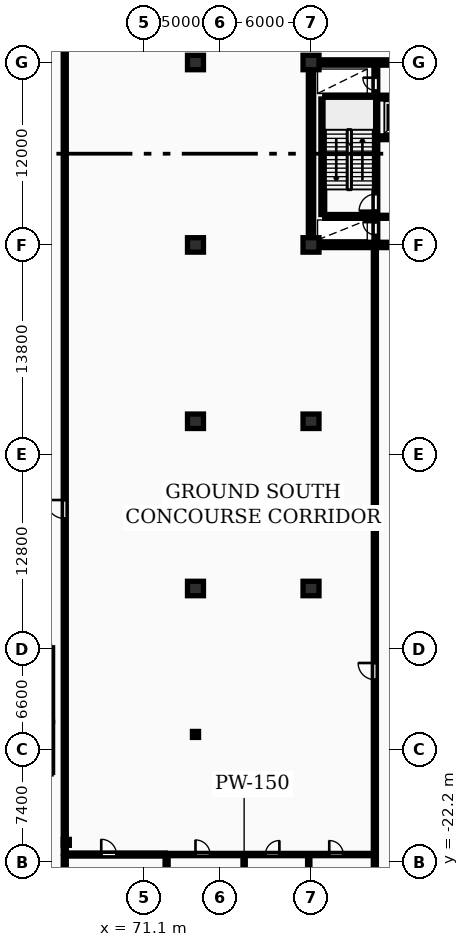
"""IFC4 building model, lengths in metres.
Left out: names, types, materials, properties, quantities, classifications, styles, units other than length and angle.
Written with IfcOpenShell. Run it as: python <this file> out.ifc"""

import sys

from ifc_helpers import new_model, si_unit, direction, frame, frame_2d, origin, origin_2d, place, context, subcontext, project, spatial, rectangle, i_section, extrude, element, fill, save


model = new_model("IFC4")
c1 = context("Model", 3, precision=1e-05, world=origin(), true_north=direction((0.0, 1.0)))
c2 = subcontext(c1, "Body", "Model", "MODEL_VIEW")
j1 = project(units=[si_unit("LENGTHUNIT", "METRE"), si_unit("PLANEANGLEUNIT", "RADIAN")], contexts=[c1])
p1 = place(None, origin())
s1 = spatial("IfcSite", under=j1, at=p1, CompositionType="ELEMENT")
p2 = place(p1, origin())
s2 = spatial("IfcBuilding", under=s1, at=p2, CompositionType="ELEMENT")
p3 = place(p2, origin())
s3 = spatial("IfcBuildingStorey", under=s2, at=p3, CompositionType="ELEMENT", Elevation=0.0)
for number, where, z_axis, x_axis in (
    (1, (74.5, -4.2, 0.0), (0.0, 0.0, 1.0), (1.0, 0.0, 0.0)),
    (2, (74.5, 6.8, 0.0), (0.0, 0.0, 1.0), (1.0, 0.0, 0.0)),
    (3, (74.5, 18.4, 0.0), (0.0, 0.0, 1.0), (1.0, 0.0, 0.0)),
    (4, (74.5, 30.4, 0.0), (0.0, 0.0, 1.0), (1.0, 0.0, 0.0)),
    (5, (82.1, -4.2, 0.0), (0.0, 0.0, 1.0), (1.0, 0.0, 0.0)),
    (6, (82.1, 6.8, 0.0), (0.0, 0.0, 1.0), (1.0, 0.0, 0.0)),
    (7, (82.1, 18.4, 0.0), (0.0, 0.0, 1.0), (1.0, 0.0, 0.0)),
    (8, (82.1, 30.4, 0.0), (0.0, 0.0, 1.0), (1.0, 0.0, 0.0)),
):
    element("IfcColumn", number, at=place(p3, frame(where, z_axis=z_axis, x_axis=x_axis)), inside=s3, PredefinedType="COLUMN", context=c2, shape_type="SweptSolid", body=[
        extrude(rectangle(XDim=1.05, YDim=0.95, at=origin_2d()), origin(), (0.0, 0.0, 1.0), 5.4),
    ])
for number, where, z_axis, x_axis in (
    (9, (74.5, -13.8, 0.0), (0.0, 0.0, 1.0), (1.0, 0.0, 0.0)),
    (10, (66.0, -20.9, 0.0), (0.0, 0.0, 1.0), (1.0, 0.0, 0.0)),
):
    element("IfcColumn", number, at=place(p3, frame(where, z_axis=z_axis, x_axis=x_axis)), inside=s3, PredefinedType="COLUMN", context=c2, shape_type="SweptSolid", body=[
        extrude(i_section(OverallWidth=0.399, OverallDepth=0.394, WebThickness=0.023, FlangeThickness=0.037, FilletRadius=0.015, at=origin_2d()), origin(), (0.0, 0.0, 1.0), 5.4),
    ])
p4 = place(p3, frame((81.925, 30.4, 0.0), z_axis=(0.0, 0.0, 1.0), x_axis=(1.0, 0.0, 0.0)))
e11 = element("IfcWall", 11, at=p4, inside=s3, PredefinedType="SHEAR", context=c2, shape_type="SweptSolid", body=[
    extrude(rectangle(XDim=36.265, YDim=0.35, at=frame_2d((18.132, 0.0))), origin(), (0.0, 0.0, 1.0), 5.4),
])
p5 = place(p3, frame((82.1, 18.575, 0.0), z_axis=(0.0, 0.0, 1.0), x_axis=(0.0, 1.0, 0.0)))
e12 = element("IfcWall", 12, at=p5, inside=s3, PredefinedType="SHEAR", context=c2, shape_type="SweptSolid", body=[
    extrude(rectangle(XDim=11.65, YDim=0.35, at=frame_2d((5.825, 0.0))), origin(), (0.0, 0.0, 1.0), 5.4),
])
p6 = place(p3, frame((81.925, 18.4, 0.0), z_axis=(0.0, 0.0, 1.0), x_axis=(1.0, 0.0, 0.0)))
e13 = element("IfcWall", 13, at=p6, inside=s3, PredefinedType="SHEAR", context=c2, shape_type="SweptSolid", body=[
    extrude(rectangle(XDim=36.265, YDim=0.35, at=frame_2d((18.132, 0.0))), origin(), (0.0, 0.0, 1.0), 5.4),
])
p7 = place(p6, frame((5.675, 0.0, 0.0)))
e14 = element("IfcOpeningElement", 14, at=p7, cuts=e13, PredefinedType="OPENING", context=c2, shape_type="SweptSolid", body=[
    extrude(rectangle(XDim=1.0, YDim=2.15, at=frame_2d((0.5, 1.075))), frame((0.0, 0.185, 0.0), z_axis=(0.0, -1.0, 0.0), x_axis=(1.0, 0.0, 0.0)), (0.0, 0.0, 1.0), 0.37),
])
p8 = place(p6, frame((21.925, 0.0, 0.0)))
e15 = element("IfcOpeningElement", 15, at=p8, cuts=e13, PredefinedType="OPENING", context=c2, shape_type="SweptSolid", body=[
    extrude(rectangle(XDim=1.5, YDim=2.2, at=frame_2d((0.75, 1.1))), frame((0.0, 0.185, 0.0), z_axis=(0.0, -1.0, 0.0), x_axis=(1.0, 0.0, 0.0)), (0.0, 0.0, 1.0), 0.37),
])
p9 = place(p6, frame((29.875, 0.0, 0.0)))
e16 = element("IfcOpeningElement", 16, at=p9, cuts=e13, PredefinedType="OPENING", context=c2, shape_type="SweptSolid", body=[
    extrude(rectangle(XDim=1.0, YDim=2.15, at=frame_2d((0.5, 1.075))), frame((0.0, 0.185, 0.0), z_axis=(0.0, -1.0, 0.0), x_axis=(1.0, 0.0, 0.0)), (0.0, 0.0, 1.0), 0.37),
])
p10 = place(p3, frame((82.875, 20.4, 0.0), z_axis=(0.0, 0.0, 1.0), x_axis=(0.0, 1.0, 0.0)))
e17 = element("IfcWall", 17, at=p10, inside=s3, PredefinedType="SHEAR", context=c2, shape_type="SweptSolid", body=[
    extrude(rectangle(XDim=7.6, YDim=0.25, at=frame_2d((3.8, 0.0))), origin(), (0.0, 0.0, 1.0), 5.4),
])
p11 = place(p3, frame((86.365, 18.6, 0.0), z_axis=(0.0, 0.0, 1.0), x_axis=(0.0, 1.0, 0.0)))
e18 = element("IfcWall", 18, at=p11, inside=s3, PredefinedType="SHEAR", context=c2, shape_type="SweptSolid", body=[
    extrude(rectangle(XDim=11.6, YDim=0.25, at=frame_2d((5.8, 0.0))), origin(), (0.0, 0.0, 1.0), 5.4),
])
p12 = place(p11, frame((0.45, 0.0, 0.0)))
e19 = element("IfcOpeningElement", 19, at=p12, cuts=e18, PredefinedType="OPENING", context=c2, shape_type="SweptSolid", body=[
    extrude(rectangle(XDim=0.85, YDim=2.05, at=frame_2d((0.425, 1.025))), frame((0.0, 0.135, 0.0), z_axis=(0.0, -1.0, 0.0), x_axis=(1.0, 0.0, 0.0)), (0.0, 0.0, 1.0), 0.27),
])
p13 = place(p11, frame((2.05, 0.0, 0.0)))
e20 = element("IfcOpeningElement", 20, at=p13, cuts=e18, PredefinedType="OPENING", context=c2, shape_type="SweptSolid", body=[
    extrude(rectangle(XDim=1.1, YDim=2.1, at=frame_2d((0.55, 1.05))), frame((0.0, 0.135, 0.0), z_axis=(0.0, -1.0, 0.0), x_axis=(1.0, 0.0, 0.0)), (0.0, 0.0, 1.0), 0.27),
])
p14 = place(p11, frame((9.95, 0.0, 0.0)))
e21 = element("IfcOpeningElement", 21, at=p14, cuts=e18, PredefinedType="OPENING", context=c2, shape_type="SweptSolid", body=[
    extrude(rectangle(XDim=0.85, YDim=2.05, at=frame_2d((0.425, 1.025))), frame((0.0, 0.135, 0.0), z_axis=(0.0, -1.0, 0.0), x_axis=(1.0, 0.0, 0.0)), (0.0, 0.0, 1.0), 0.27),
])
p15 = place(p3, frame((83.0, 20.275, 0.0), z_axis=(0.0, 0.0, 1.0), x_axis=(1.0, 0.0, 0.0)))
e22 = element("IfcWall", 22, at=p15, inside=s3, PredefinedType="SHEAR", context=c2, shape_type="SweptSolid", body=[
    extrude(rectangle(XDim=3.24, YDim=0.25, at=frame_2d((1.62, 0.0))), origin(), (0.0, 0.0, 1.0), 5.4),
])
p16 = place(p3, frame((83.0, 28.125, 0.0), z_axis=(0.0, 0.0, 1.0), x_axis=(1.0, 0.0, 0.0)))
e23 = element("IfcWall", 23, at=p16, inside=s3, PredefinedType="SHEAR", context=c2, shape_type="SweptSolid", body=[
    extrude(rectangle(XDim=7.82, YDim=0.25, at=frame_2d((3.91, 0.0))), origin(), (0.0, 0.0, 1.0), 5.4),
])
p17 = place(p3, frame((86.5, 25.45, 0.0), z_axis=(0.0, 0.0, 1.0), x_axis=(1.0, 0.0, 0.0)))
e24 = element("IfcWall", 24, at=p17, inside=s3, PredefinedType="SHEAR", context=c2, shape_type="SweptSolid", body=[
    extrude(rectangle(XDim=4.32, YDim=0.25, at=frame_2d((2.16, 0.0))), origin(), (0.0, 0.0, 1.0), 5.4),
])
p18 = place(p17, frame((1.14, 0.0, 0.0)))
e25 = element("IfcOpeningElement", 25, at=p18, cuts=e24, PredefinedType="OPENING", context=c2, shape_type="SweptSolid", body=[
    extrude(rectangle(XDim=1.12, YDim=2.12, at=frame_2d((0.56, 1.06))), frame((0.0, 0.135, 0.0), z_axis=(0.0, -1.0, 0.0), x_axis=(1.0, 0.0, 0.0)), (0.0, 0.0, 1.0), 0.27),
])
p19 = place(p17, frame((3.25, 0.0, 0.0)))
e26 = element("IfcOpeningElement", 26, at=p19, cuts=e24, PredefinedType="OPENING", context=c2, shape_type="SweptSolid", body=[
    extrude(rectangle(XDim=0.85, YDim=2.05, at=frame_2d((0.425, 1.025))), frame((0.0, 0.135, 0.0), z_axis=(0.0, -1.0, 0.0), x_axis=(1.0, 0.0, 0.0)), (0.0, 0.0, 1.0), 0.27),
])
p20 = place(p3, frame((86.5, 20.25, 0.0), z_axis=(0.0, 0.0, 1.0), x_axis=(1.0, 0.0, 0.0)))
e27 = element("IfcWall", 27, at=p20, inside=s3, PredefinedType="PARTITIONING", context=c2, shape_type="SweptSolid", body=[
    extrude(rectangle(XDim=4.32, YDim=0.2, at=frame_2d((2.16, 0.0))), origin(), (0.0, 0.0, 1.0), 5.1),
])
p21 = place(p20, frame((1.4, 0.0, 0.0)))
e28 = element("IfcOpeningElement", 28, at=p21, cuts=e27, PredefinedType="OPENING", context=c2, shape_type="SweptSolid", body=[
    extrude(rectangle(XDim=1.1, YDim=2.1, at=frame_2d((0.55, 1.05))), frame((0.0, 0.11, 0.0), z_axis=(0.0, -1.0, 0.0), x_axis=(1.0, 0.0, 0.0)), (0.0, 0.0, 1.0), 0.22),
])
p22 = place(p3, frame((65.0, -12.925, 0.0), z_axis=(0.0, 0.0, 1.0), x_axis=(0.0, 1.0, 0.0)))
e29 = element("IfcWall", 29, at=p22, inside=s3, PredefinedType="PARTITIONING", context=c2, shape_type="SweptSolid", body=[
    extrude(rectangle(XDim=4.825, YDim=0.2, at=frame_2d((2.413, 0.0))), origin(), (0.0, 0.0, 1.0), 5.1),
])
p23 = place(p22, frame((1.6, 0.0, 0.0)))
e30 = element("IfcOpeningElement", 30, at=p23, cuts=e29, PredefinedType="OPENING", context=c2, shape_type="SweptSolid", body=[
    extrude(rectangle(XDim=1.1, YDim=2.15, at=frame_2d((0.55, 1.075))), frame((0.0, 0.11, 0.0), z_axis=(0.0, -1.0, 0.0), x_axis=(1.0, 0.0, 0.0)), (0.0, 0.0, 1.0), 0.22),
])
p24 = place(p3, frame((65.9, -21.7, 0.0), z_axis=(0.0, 0.0, 1.0), x_axis=(1.0, 0.0, 0.0)))
e31 = element("IfcWall", 31, at=p24, inside=s3, PredefinedType="PARTITIONING", context=c2, shape_type="SweptSolid", body=[
    extrude(rectangle(XDim=6.6, YDim=0.2, at=frame_2d((3.3, 0.0))), origin(), (0.0, 0.0, 1.0), 5.1),
])
p25 = place(p24, frame((2.4, 0.0, 0.0)))
e32 = element("IfcOpeningElement", 32, at=p25, cuts=e31, PredefinedType="OPENING", context=c2, shape_type="SweptSolid", body=[
    extrude(rectangle(XDim=1.0, YDim=2.1, at=frame_2d((0.5, 1.05))), frame((0.0, 0.11, 0.0), z_axis=(0.0, -1.0, 0.0), x_axis=(1.0, 0.0, 0.0)), (0.0, 0.0, 1.0), 0.22),
])
for number, where, z_axis, x_axis in (
    (33, (65.9, -26.2, 0.0), (0.0, 0.0, 1.0), (0.0, 1.0, 0.0)),
    (34, (72.6, -26.2, 0.0), (0.0, 0.0, 1.0), (0.0, 1.0, 0.0)),
):
    element("IfcWall", number, at=place(p3, frame(where, z_axis=z_axis, x_axis=x_axis)), inside=s3, PredefinedType="PARTITIONING", context=c2, shape_type="SweptSolid", body=[
        extrude(rectangle(XDim=4.35, YDim=0.2, at=frame_2d((2.175, 0.0))), origin(), (0.0, 0.0, 1.0), 5.1),
    ])
p26 = place(p3, frame((86.3, -26.2, 0.0), z_axis=(0.0, 0.0, 1.0), x_axis=(0.0, 1.0, 0.0)))
e35 = element("IfcWall", 35, at=p26, inside=s3, PredefinedType="PARTITIONING", context=c2, shape_type="SweptSolid", body=[
    extrude(rectangle(XDim=44.35, YDim=0.2, at=frame_2d((22.175, 0.0))), origin(), (0.0, 0.0, 1.0), 5.1),
])
p27 = place(p26, frame((16.0, 0.0, 0.0)))
e36 = element("IfcOpeningElement", 36, at=p27, cuts=e35, PredefinedType="OPENING", context=c2, shape_type="SweptSolid", body=[
    extrude(rectangle(XDim=1.1, YDim=2.1, at=frame_2d((0.55, 1.05))), frame((0.0, 0.11, 0.0), z_axis=(0.0, -1.0, 0.0), x_axis=(1.0, 0.0, 0.0)), (0.0, 0.0, 1.0), 0.22),
])
p28 = place(p3, frame((65.0, -16.3, 0.0), z_axis=(0.0, 0.0, 1.0), x_axis=(0.0, 1.0, 0.0)))
e37 = element("IfcWall", 37, at=p28, inside=s3, PredefinedType="PARTITIONING", context=c2, shape_type="SweptSolid", body=[
    extrude(rectangle(XDim=3.3, YDim=0.2, at=frame_2d((1.65, 0.0))), origin(), (0.0, 0.0, 1.0), 5.1),
])
p29 = place(p3, frame((72.7, -21.7, 0.0), z_axis=(0.0, 0.0, 1.0), x_axis=(1.0, 0.0, 0.0)))
e38 = element("IfcWall", 38, at=p29, inside=s3, PredefinedType="PARTITIONING", context=c2, shape_type="SweptSolid", body=[
    extrude(rectangle(XDim=13.5, YDim=0.15, at=frame_2d((6.75, 0.0))), origin(), (0.0, 0.0, 1.0), 5.1),
])
p30 = place(p29, frame((1.8, 0.0, 0.0)))
e39 = element("IfcOpeningElement", 39, at=p30, cuts=e38, PredefinedType="OPENING", context=c2, shape_type="SweptSolid", body=[
    extrude(rectangle(XDim=0.96, YDim=2.1, at=frame_2d((0.48, 1.05))), frame((0.0, 0.085, 0.0), z_axis=(0.0, -1.0, 0.0), x_axis=(1.0, 0.0, 0.0)), (0.0, 0.0, 1.0), 0.17),
])
p31 = place(p29, frame((6.4, 0.0, 0.0)))
e40 = element("IfcOpeningElement", 40, at=p31, cuts=e38, PredefinedType="OPENING", context=c2, shape_type="SweptSolid", body=[
    extrude(rectangle(XDim=0.92, YDim=2.08, at=frame_2d((0.46, 1.04))), frame((0.0, 0.085, 0.0), z_axis=(0.0, -1.0, 0.0), x_axis=(1.0, 0.0, 0.0)), (0.0, 0.0, 1.0), 0.17),
])
p32 = place(p29, frame((10.6, 0.0, 0.0)))
e41 = element("IfcOpeningElement", 41, at=p32, cuts=e38, PredefinedType="OPENING", context=c2, shape_type="SweptSolid", body=[
    extrude(rectangle(XDim=0.92, YDim=2.08, at=frame_2d((0.46, 1.04))), frame((0.0, 0.085, 0.0), z_axis=(0.0, -1.0, 0.0), x_axis=(1.0, 0.0, 0.0)), (0.0, 0.0, 1.0), 0.17),
])
for number, where, z_axis, x_axis in (
    (42, (77.7, -26.2, 0.0), (0.0, 0.0, 1.0), (0.0, 1.0, 0.0)),
    (43, (81.95, -26.2, 0.0), (0.0, 0.0, 1.0), (0.0, 1.0, 0.0)),
):
    element("IfcWall", number, at=place(p3, frame(where, z_axis=z_axis, x_axis=x_axis)), inside=s3, PredefinedType="PARTITIONING", context=c2, shape_type="SweptSolid", body=[
        extrude(rectangle(XDim=4.4, YDim=0.15, at=frame_2d((2.2, 0.0))), origin(), (0.0, 0.0, 1.0), 5.1),
    ])
p33 = place(p3, frame((65.9, -21.6, 0.0), z_axis=(0.0, 0.0, 1.0), x_axis=(0.0, 1.0, 0.0)))
e44 = element("IfcWall", 44, at=p33, inside=s3, PredefinedType="PARTITIONING", context=c2, shape_type="SweptSolid", body=[
    extrude(rectangle(XDim=53.15, YDim=0.2, at=frame_2d((26.575, 0.0))), origin(), (0.0, 0.0, 1.0), 5.1),
])
p34 = place(p33, frame((22.0, 0.0, 0.0)))
e45 = element("IfcOpeningElement", 45, at=p34, cuts=e44, PredefinedType="OPENING", context=c2, shape_type="SweptSolid", body=[
    extrude(rectangle(XDim=1.22, YDim=2.18, at=frame_2d((0.61, 1.09))), frame((0.0, 0.11, 0.0), z_axis=(0.0, -1.0, 0.0), x_axis=(1.0, 0.0, 0.0)), (0.0, 0.0, 1.0), 0.22),
])
p35 = place(p12, origin())
e46 = element("IfcDoor", 46, at=p35, inside=s3, OperationType="SINGLE_SWING_RIGHT", PredefinedType="DOOR", context=c2, shape_type="SweptSolid", body=[
    extrude(rectangle(XDim=0.85, YDim=2.05, at=frame_2d((0.425, 1.025))), frame((0.0, 0.025, 0.0), z_axis=(0.0, -1.0, 0.0), x_axis=(1.0, 0.0, 0.0)), (0.0, 0.0, 1.0), 0.05),
])
fill(e19, e46)
p36 = place(p13, origin())
e47 = element("IfcDoor", 47, at=p36, inside=s3, OperationType="SINGLE_SWING_LEFT", PredefinedType="DOOR", context=c2, shape_type="SweptSolid", body=[
    extrude(rectangle(XDim=1.1, YDim=2.1, at=frame_2d((0.55, 1.05))), frame((0.0, 0.025, 0.0), z_axis=(0.0, -1.0, 0.0), x_axis=(1.0, 0.0, 0.0)), (0.0, 0.0, 1.0), 0.05),
])
fill(e20, e47)
p37 = place(p14, origin())
e48 = element("IfcDoor", 48, at=p37, inside=s3, OperationType="SINGLE_SWING_RIGHT", PredefinedType="DOOR", context=c2, shape_type="SweptSolid", body=[
    extrude(rectangle(XDim=0.85, YDim=2.05, at=frame_2d((0.425, 1.025))), frame((0.0, 0.025, 0.0), z_axis=(0.0, -1.0, 0.0), x_axis=(1.0, 0.0, 0.0)), (0.0, 0.0, 1.0), 0.05),
])
fill(e21, e48)
p38 = place(p25, origin())
e49 = element("IfcDoor", 49, at=p38, inside=s3, OperationType="SINGLE_SWING_LEFT", PredefinedType="DOOR", context=c2, shape_type="SweptSolid", body=[
    extrude(rectangle(XDim=1.0, YDim=2.1, at=frame_2d((0.5, 1.05))), frame((0.0, 0.025, 0.0), z_axis=(0.0, -1.0, 0.0), x_axis=(1.0, 0.0, 0.0)), (0.0, 0.0, 1.0), 0.05),
])
fill(e32, e49)
p39 = place(p27, origin())
e50 = element("IfcDoor", 50, at=p39, inside=s3, OperationType="SINGLE_SWING_RIGHT", PredefinedType="DOOR", context=c2, shape_type="SweptSolid", body=[
    extrude(rectangle(XDim=1.1, YDim=2.1, at=frame_2d((0.55, 1.05))), frame((0.0, 0.025, 0.0), z_axis=(0.0, -1.0, 0.0), x_axis=(1.0, 0.0, 0.0)), (0.0, 0.0, 1.0), 0.05),
])
fill(e36, e50)
p40 = place(p30, origin())
e51 = element("IfcDoor", 51, at=p40, inside=s3, OperationType="SINGLE_SWING_LEFT", PredefinedType="DOOR", context=c2, shape_type="SweptSolid", body=[
    extrude(rectangle(XDim=0.96, YDim=2.1, at=frame_2d((0.48, 1.05))), frame((0.0, 0.025, 0.0), z_axis=(0.0, -1.0, 0.0), x_axis=(1.0, 0.0, 0.0)), (0.0, 0.0, 1.0), 0.05),
])
fill(e39, e51)
p41 = place(p31, origin())
e52 = element("IfcDoor", 52, at=p41, inside=s3, OperationType="SINGLE_SWING_RIGHT", PredefinedType="DOOR", context=c2, shape_type="SweptSolid", body=[
    extrude(rectangle(XDim=0.92, YDim=2.08, at=frame_2d((0.46, 1.04))), frame((0.0, 0.025, 0.0), z_axis=(0.0, -1.0, 0.0), x_axis=(1.0, 0.0, 0.0)), (0.0, 0.0, 1.0), 0.05),
])
fill(e40, e52)
p42 = place(p32, origin())
e53 = element("IfcDoor", 53, at=p42, inside=s3, OperationType="SINGLE_SWING_LEFT", PredefinedType="DOOR", context=c2, shape_type="SweptSolid", body=[
    extrude(rectangle(XDim=0.92, YDim=2.08, at=frame_2d((0.46, 1.04))), frame((0.0, 0.025, 0.0), z_axis=(0.0, -1.0, 0.0), x_axis=(1.0, 0.0, 0.0)), (0.0, 0.0, 1.0), 0.05),
])
fill(e41, e53)
p43 = place(p34, origin())
e54 = element("IfcDoor", 54, at=p43, inside=s3, OperationType="SINGLE_SWING_RIGHT", PredefinedType="DOOR", context=c2, shape_type="SweptSolid", body=[
    extrude(rectangle(XDim=1.22, YDim=2.18, at=frame_2d((0.61, 1.09))), frame((0.0, 0.025, 0.0), z_axis=(0.0, -1.0, 0.0), x_axis=(1.0, 0.0, 0.0)), (0.0, 0.0, 1.0), 0.05),
])
fill(e45, e54)
save(model, sys.argv[1])
